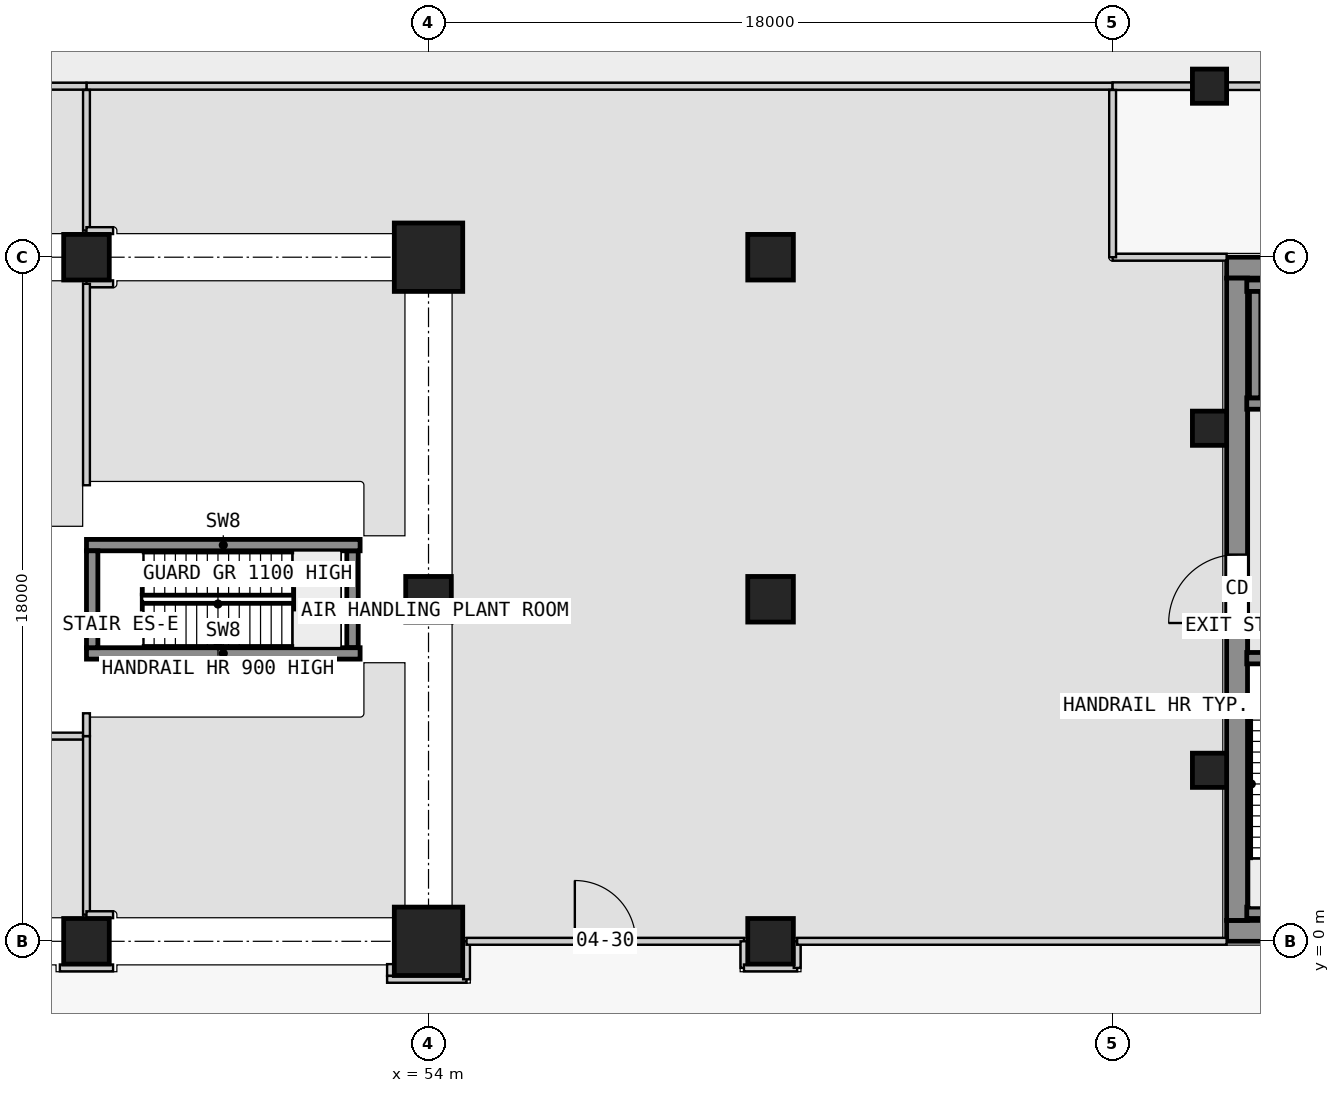
"""IFC4 building model, lengths in metres.
Left out: names, types, materials, properties, quantities, classifications, styles, units other than length and angle.
Written with IfcOpenShell. Run it as: python <this file> out.ifc"""

import sys

from ifc_helpers import new_model, si_unit, direction, frame, frame_2d, origin, origin_2d, place, context, subcontext, project, spatial, rectangle, extrude, element, fill, save


model = new_model("IFC4")
c1 = context("Model", 3, precision=1e-05, world=origin(), true_north=direction((0.0, 1.0)))
c2 = subcontext(c1, "Body", "Model", "MODEL_VIEW")
j1 = project(units=[si_unit("LENGTHUNIT", "METRE"), si_unit("PLANEANGLEUNIT", "RADIAN")], contexts=[c1])
p1 = place(None, origin())
s1 = spatial("IfcSite", under=j1, at=p1, CompositionType="ELEMENT")
p2 = place(p1, origin())
s2 = spatial("IfcBuilding", under=s1, at=p2, CompositionType="ELEMENT")
p3 = place(p2, frame((0.0, 0.0, 21.8)))
s3 = spatial("IfcBuildingStorey", under=s2, at=p3, CompositionType="ELEMENT", Elevation=21.8)
for number, where, z_axis, x_axis in (
    (1, (45.0, 0.0, 0.0), (0.0, 0.0, 1.0), (1.0, 0.0, 0.0)),
    (2, (45.0, 18.0, 0.0), (0.0, 0.0, 1.0), (1.0, 0.0, 0.0)),
):
    element("IfcColumn", number, at=place(p3, frame(where, z_axis=z_axis, x_axis=x_axis)), inside=s3, PredefinedType="COLUMN", context=c2, shape_type="SweptSolid", body=[
        extrude(rectangle(XDim=1.2, YDim=1.2, at=origin_2d()), origin(), (0.0, 0.0, 1.0), 5.0),
    ])
p4 = place(p3, frame((54.0, 0.0, 0.0), z_axis=(0.0, 0.0, 1.0), x_axis=(1.0, 0.0, 0.0)))
e3 = element("IfcColumn", 3, at=p4, inside=s3, PredefinedType="COLUMN", context=c2, shape_type="SweptSolid", body=[
    extrude(rectangle(XDim=1.8, YDim=1.8, at=origin_2d()), origin(), (0.0, 0.0, 1.0), 5.0),
])
p5 = place(p3, frame((54.0, 9.0, 0.0), z_axis=(0.0, 0.0, 1.0), x_axis=(1.0, 0.0, 0.0)))
e4 = element("IfcColumn", 4, at=p5, inside=s3, PredefinedType="COLUMN", context=c2, shape_type="SweptSolid", body=[
    extrude(rectangle(XDim=1.2, YDim=1.2, at=origin_2d()), origin(), (0.0, 0.0, 1.0), 5.0),
])
p6 = place(p3, frame((54.0, 18.0, 0.0), z_axis=(0.0, 0.0, 1.0), x_axis=(1.0, 0.0, 0.0)))
e5 = element("IfcColumn", 5, at=p6, inside=s3, PredefinedType="COLUMN", context=c2, shape_type="SweptSolid", body=[
    extrude(rectangle(XDim=1.8, YDim=1.8, at=origin_2d()), origin(), (0.0, 0.0, 1.0), 5.0),
])
for number, where, z_axis, x_axis in (
    (6, (63.0, 0.0, 0.0), (0.0, 0.0, 1.0), (1.0, 0.0, 0.0)),
    (7, (63.0, 9.0, 0.0), (0.0, 0.0, 1.0), (1.0, 0.0, 0.0)),
    (8, (63.0, 18.0, 0.0), (0.0, 0.0, 1.0), (1.0, 0.0, 0.0)),
):
    element("IfcColumn", number, at=place(p3, frame(where, z_axis=z_axis, x_axis=x_axis)), inside=s3, PredefinedType="COLUMN", context=c2, shape_type="SweptSolid", body=[
        extrude(rectangle(XDim=1.2, YDim=1.2, at=origin_2d()), origin(), (0.0, 0.0, 1.0), 5.0),
    ])
for number, where, z_axis, x_axis in (
    (9, (74.55, 22.5, 0.0), (0.0, 0.0, 1.0), (1.0, 0.0, 0.0)),
    (10, (74.55, 13.5, 0.0), (0.0, 0.0, 1.0), (1.0, 0.0, 0.0)),
    (11, (74.55, 4.5, 0.0), (0.0, 0.0, 1.0), (1.0, 0.0, 0.0)),
):
    element("IfcColumn", number, at=place(p3, frame(where, z_axis=z_axis, x_axis=x_axis)), inside=s3, PredefinedType="COLUMN", context=c2, shape_type="SweptSolid", body=[
        extrude(rectangle(XDim=0.9, YDim=0.9, at=origin_2d()), origin(), (0.0, 0.0, 1.0), 5.0),
    ])
for number, where, z_axis, x_axis in (
    (12, (75.0, 0.275, 0.0), (0.0, 0.0, 1.0), (1.0, 0.0, 0.0)),
    (13, (75.0, 17.725, 0.0), (0.0, 0.0, 1.0), (1.0, 0.0, 0.0)),
):
    element("IfcWall", number, at=place(p3, frame(where, z_axis=z_axis, x_axis=x_axis)), inside=s3, PredefinedType="SHEAR", context=c2, shape_type="SweptSolid", body=[
        extrude(rectangle(XDim=14.5, YDim=0.55, at=frame_2d((7.25, 0.0))), origin(), (0.0, 0.0, 1.0), 4.5),
    ])
p7 = place(p3, frame((75.275, 0.55, 0.0), z_axis=(0.0, 0.0, 1.0), x_axis=(0.0, 1.0, 0.0)))
e14 = element("IfcWall", 14, at=p7, inside=s3, PredefinedType="SHEAR", context=c2, shape_type="SweptSolid", body=[
    extrude(rectangle(XDim=16.9, YDim=0.55, at=frame_2d((8.45, 0.0))), origin(), (0.0, 0.0, 1.0), 4.5),
])
p8 = place(p7, frame((7.825, 0.0, 0.0)))
e15 = element("IfcOpeningElement", 15, at=p8, cuts=e14, PredefinedType="OPENING", context=c2, shape_type="SweptSolid", body=[
    extrude(rectangle(XDim=1.8, YDim=2.1, at=frame_2d((0.9, 1.05))), frame((0.0, 0.285, 0.0), z_axis=(0.0, -1.0, 0.0), x_axis=(1.0, 0.0, 0.0)), (0.0, 0.0, 1.0), 0.57),
])
p9 = place(p3, frame((75.53, 0.75, 0.0), z_axis=(0.0, 0.0, 1.0), x_axis=(1.0, 0.0, 0.0)))
e16 = element("IfcWall", 16, at=p9, inside=s3, PredefinedType="SHEAR", context=c2, shape_type="SweptSolid", body=[
    extrude(rectangle(XDim=5.77, YDim=0.3, at=frame_2d((2.885, 0.0))), origin(), (0.0, 0.0, 1.0), 4.5),
])
p10 = place(p3, frame((75.53, 7.45, 0.0), z_axis=(0.0, 0.0, 1.0), x_axis=(1.0, 0.0, 0.0)))
e17 = element("IfcWall", 17, at=p10, inside=s3, PredefinedType="SHEAR", context=c2, shape_type="SweptSolid", body=[
    extrude(rectangle(XDim=5.77, YDim=0.3, at=frame_2d((2.885, 0.0))), origin(), (0.0, 0.0, 1.0), 4.5),
])
p11 = place(p10, frame((0.75, 0.0, 0.0)))
e18 = element("IfcOpeningElement", 18, at=p11, cuts=e17, PredefinedType="OPENING", context=c2, shape_type="SweptSolid", body=[
    extrude(rectangle(XDim=1.1, YDim=2.1, at=frame_2d((0.55, 1.05))), frame((0.0, 0.16, 0.0), z_axis=(0.0, -1.0, 0.0), x_axis=(1.0, 0.0, 0.0)), (0.0, 0.0, 1.0), 0.32),
])
p12 = place(p10, frame((3.55, 0.0, 0.0)))
e19 = element("IfcOpeningElement", 19, at=p12, cuts=e17, PredefinedType="OPENING", context=c2, shape_type="SweptSolid", body=[
    extrude(rectangle(XDim=1.1, YDim=2.1, at=frame_2d((0.55, 1.05))), frame((0.0, 0.16, 0.0), z_axis=(0.0, -1.0, 0.0), x_axis=(1.0, 0.0, 0.0)), (0.0, 0.0, 1.0), 0.32),
])
p13 = place(p3, frame((75.53, 17.25, 0.0), z_axis=(0.0, 0.0, 1.0), x_axis=(1.0, 0.0, 0.0)))
e20 = element("IfcWall", 20, at=p13, inside=s3, PredefinedType="SHEAR", context=c2, shape_type="SweptSolid", body=[
    extrude(rectangle(XDim=9.97, YDim=0.3, at=frame_2d((4.985, 0.0))), origin(), (0.0, 0.0, 1.0), 4.5),
])
p14 = place(p3, frame((75.53, 14.15, 0.0), z_axis=(0.0, 0.0, 1.0), x_axis=(1.0, 0.0, 0.0)))
e21 = element("IfcWall", 21, at=p14, inside=s3, PredefinedType="SHEAR", context=c2, shape_type="SweptSolid", body=[
    extrude(rectangle(XDim=9.97, YDim=0.3, at=frame_2d((4.985, 0.0))), origin(), (0.0, 0.0, 1.0), 4.5),
])
p15 = place(p14, frame((0.85, 0.0, 0.0)))
e22 = element("IfcOpeningElement", 22, at=p15, cuts=e21, PredefinedType="OPENING", context=c2, shape_type="SweptSolid", body=[
    extrude(rectangle(XDim=1.1, YDim=2.1, at=frame_2d((0.55, 1.05))), frame((0.0, 0.16, 0.0), z_axis=(0.0, -1.0, 0.0), x_axis=(1.0, 0.0, 0.0)), (0.0, 0.0, 1.0), 0.32),
])
p16 = place(p14, frame((3.35, 0.0, 0.0)))
e23 = element("IfcOpeningElement", 23, at=p16, cuts=e21, PredefinedType="OPENING", context=c2, shape_type="SweptSolid", body=[
    extrude(rectangle(XDim=1.1, YDim=2.1, at=frame_2d((0.55, 1.05))), frame((0.0, 0.16, 0.0), z_axis=(0.0, -1.0, 0.0), x_axis=(1.0, 0.0, 0.0)), (0.0, 0.0, 1.0), 0.32),
])
p17 = place(p14, frame((5.75, 0.0, 0.0)))
e24 = element("IfcOpeningElement", 24, at=p17, cuts=e21, PredefinedType="OPENING", context=c2, shape_type="SweptSolid", body=[
    extrude(rectangle(XDim=1.1, YDim=2.1, at=frame_2d((0.55, 1.05))), frame((0.0, 0.16, 0.0), z_axis=(0.0, -1.0, 0.0), x_axis=(1.0, 0.0, 0.0)), (0.0, 0.0, 1.0), 0.32),
])
p18 = place(p14, frame((8.05, 0.0, 0.0)))
e25 = element("IfcOpeningElement", 25, at=p18, cuts=e21, PredefinedType="OPENING", context=c2, shape_type="SweptSolid", body=[
    extrude(rectangle(XDim=1.1, YDim=2.1, at=frame_2d((0.55, 1.05))), frame((0.0, 0.16, 0.0), z_axis=(0.0, -1.0, 0.0), x_axis=(1.0, 0.0, 0.0)), (0.0, 0.0, 1.0), 0.32),
])
p19 = place(p3, frame((75.75, 14.3, 0.0), z_axis=(0.0, 0.0, 1.0), x_axis=(0.0, 1.0, 0.0)))
e26 = element("IfcWall", 26, at=p19, inside=s3, PredefinedType="SHEAR", context=c2, shape_type="SweptSolid", body=[
    extrude(rectangle(XDim=2.8, YDim=0.3, at=frame_2d((1.4, 0.0))), origin(), (0.0, 0.0, 1.0), 4.5),
])
for number, where, z_axis, x_axis in (
    (27, (45.15, 7.725, 0.0), (0.0, 0.0, 1.0), (0.0, 1.0, 0.0)),
    (28, (52.0, 7.725, 0.0), (0.0, 0.0, 1.0), (0.0, 1.0, 0.0)),
):
    element("IfcWall", number, at=place(p3, frame(where, z_axis=z_axis, x_axis=x_axis)), inside=s3, PredefinedType="SHEAR", context=c2, shape_type="SweptSolid", body=[
        extrude(rectangle(XDim=2.55, YDim=0.3, at=frame_2d((1.275, 0.0))), origin(), (0.0, 0.0, 1.0), 5.0),
    ])
for number, where, z_axis, x_axis in (
    (29, (45.0, 7.575, 0.0), (0.0, 0.0, 1.0), (1.0, 0.0, 0.0)),
    (30, (45.0, 10.425, 0.0), (0.0, 0.0, 1.0), (1.0, 0.0, 0.0)),
):
    element("IfcWall", number, at=place(p3, frame(where, z_axis=z_axis, x_axis=x_axis)), inside=s3, PredefinedType="SHEAR", context=c2, shape_type="SweptSolid", body=[
        extrude(rectangle(XDim=7.2, YDim=0.3, at=frame_2d((3.6, 0.0))), origin(), (0.0, 0.0, 1.0), 5.0),
    ])
p20 = place(p3, frame((53.0, -0.6, 0.0), z_axis=(0.0, 0.0, 1.0), x_axis=(0.0, -1.0, 0.0)))
e31 = element("IfcWall", 31, at=p20, inside=s3, PredefinedType="PARTITIONING", context=c2, shape_type="SweptSolid", body=[
    extrude(rectangle(XDim=0.31, YDim=0.18, at=frame_2d((0.155, 0.0))), origin(), (0.0, 0.0, 1.0), 4.5),
])
p21 = place(p3, frame((52.91, -1.0, 0.0), z_axis=(0.0, 0.0, 1.0), x_axis=(1.0, 0.0, 0.0)))
e32 = element("IfcWall", 32, at=p21, inside=s3, PredefinedType="PARTITIONING", context=c2, shape_type="SweptSolid", body=[
    extrude(rectangle(XDim=2.09, YDim=0.18, at=frame_2d((1.045, 0.0))), origin(), (0.0, 0.0, 1.0), 4.5),
])
p22 = place(p3, frame((55.0, -1.0, 0.0), z_axis=(0.0, 0.0, 1.0), x_axis=(0.0, 1.0, 0.0)))
e33 = element("IfcWall", 33, at=p22, inside=s3, PredefinedType="PARTITIONING", context=c2, shape_type="SweptSolid", body=[
    extrude(rectangle(XDim=1.0, YDim=0.18, at=frame_2d((0.5, 0.0))), origin(), (0.0, 0.0, 1.0), 4.5),
])
p23 = place(p3, frame((55.0, 0.0, 0.0), z_axis=(0.0, 0.0, 1.0), x_axis=(1.0, 0.0, 0.0)))
e34 = element("IfcWall", 34, at=p23, inside=s3, PredefinedType="PARTITIONING", context=c2, shape_type="SweptSolid", body=[
    extrude(rectangle(XDim=7.3, YDim=0.18, at=frame_2d((3.65, 0.0))), origin(), (0.0, 0.0, 1.0), 4.5),
])
p24 = place(p23, frame((2.85, 0.0, 0.0)))
e35 = element("IfcOpeningElement", 35, at=p24, cuts=e34, PredefinedType="OPENING", context=c2, shape_type="SweptSolid", body=[
    extrude(rectangle(XDim=1.6, YDim=2.4, at=frame_2d((0.8, 1.2))), frame((0.0, 0.1, 0.0), z_axis=(0.0, -1.0, 0.0), x_axis=(1.0, 0.0, 0.0)), (0.0, 0.0, 1.0), 0.2),
])
p25 = place(p3, frame((62.3, 0.0, 0.0), z_axis=(0.0, 0.0, 1.0), x_axis=(0.0, -1.0, 0.0)))
e36 = element("IfcWall", 36, at=p25, inside=s3, PredefinedType="PARTITIONING", context=c2, shape_type="SweptSolid", body=[
    extrude(rectangle(XDim=0.7, YDim=0.18, at=frame_2d((0.35, 0.0))), origin(), (0.0, 0.0, 1.0), 4.5),
])
p26 = place(p3, frame((62.3, -0.7, 0.0), z_axis=(0.0, 0.0, 1.0), x_axis=(1.0, 0.0, 0.0)))
e37 = element("IfcWall", 37, at=p26, inside=s3, PredefinedType="PARTITIONING", context=c2, shape_type="SweptSolid", body=[
    extrude(rectangle(XDim=1.4, YDim=0.18, at=frame_2d((0.7, 0.0))), origin(), (0.0, 0.0, 1.0), 4.5),
])
p27 = place(p3, frame((63.7, -0.7, 0.0), z_axis=(0.0, 0.0, 1.0), x_axis=(0.0, 1.0, 0.0)))
e38 = element("IfcWall", 38, at=p27, inside=s3, PredefinedType="PARTITIONING", context=c2, shape_type="SweptSolid", body=[
    extrude(rectangle(XDim=0.7, YDim=0.18, at=frame_2d((0.35, 0.0))), origin(), (0.0, 0.0, 1.0), 4.5),
])
p28 = place(p3, frame((63.7, 0.0, 0.0), z_axis=(0.0, 0.0, 1.0), x_axis=(1.0, 0.0, 0.0)))
e39 = element("IfcWall", 39, at=p28, inside=s3, PredefinedType="PARTITIONING", context=c2, shape_type="SweptSolid", body=[
    extrude(rectangle(XDim=11.3, YDim=0.18, at=frame_2d((5.65, 0.0))), origin(), (0.0, 0.0, 1.0), 3.7),
])
p29 = place(p3, frame((72.0, 22.5, 0.0), z_axis=(0.0, 0.0, 1.0), x_axis=(-1.0, 0.0, 0.0)))
e40 = element("IfcWall", 40, at=p29, inside=s3, PredefinedType="PARTITIONING", context=c2, shape_type="SweptSolid", body=[
    extrude(rectangle(XDim=27.0, YDim=0.18, at=frame_2d((13.5, 0.0))), origin(), (0.0, 0.0, 1.0), 4.5),
])
p30 = place(p3, frame((44.3, -0.7, 0.0), z_axis=(0.0, 0.0, 1.0), x_axis=(1.0, 0.0, 0.0)))
e41 = element("IfcWall", 41, at=p30, inside=s3, PredefinedType="PARTITIONING", context=c2, shape_type="SweptSolid", body=[
    extrude(rectangle(XDim=1.4, YDim=0.18, at=frame_2d((0.7, 0.0))), origin(), (0.0, 0.0, 1.0), 4.5),
])
p31 = place(p3, frame((82.05, 22.5, 0.0), z_axis=(0.0, 0.0, 1.0), x_axis=(-1.0, 0.0, 0.0)))
e42 = element("IfcWall", 42, at=p31, inside=s3, PredefinedType="PARTITIONING", context=c2, shape_type="SweptSolid", body=[
    extrude(rectangle(XDim=7.05, YDim=0.2, at=frame_2d((3.525, 0.0))), origin(), (0.0, 0.0, 1.0), 4.5),
])
p32 = place(p3, frame((74.1, 22.5, 0.0), z_axis=(0.0, 0.0, 1.0), x_axis=(-1.0, 0.0, 0.0)))
e43 = element("IfcWall", 43, at=p32, inside=s3, PredefinedType="PARTITIONING", context=c2, shape_type="SweptSolid", body=[
    extrude(rectangle(XDim=2.1, YDim=0.2, at=frame_2d((1.05, 0.0))), origin(), (0.0, 0.0, 1.0), 4.5),
])
p33 = place(p3, frame((45.0, 22.5, 0.0), z_axis=(0.0, 0.0, 1.0), x_axis=(-1.0, 0.0, 0.0)))
e44 = element("IfcWall", 44, at=p33, inside=s3, PredefinedType="PARTITIONING", context=c2, shape_type="SweptSolid", body=[
    extrude(rectangle(XDim=18.0, YDim=0.18, at=frame_2d((9.0, 0.0))), origin(), (0.0, 0.0, 1.0), 4.5),
])
p34 = place(p33, frame((8.1, 0.0, 0.0)))
e45 = element("IfcOpeningElement", 45, at=p34, cuts=e44, PredefinedType="OPENING", context=c2, shape_type="SweptSolid", body=[
    extrude(rectangle(XDim=1.6, YDim=2.4, at=frame_2d((0.8, 1.2))), frame((0.0, 0.1, 0.0), z_axis=(0.0, -1.0, 0.0), x_axis=(1.0, 0.0, 0.0)), (0.0, 0.0, 1.0), 0.2),
])
p35 = place(p3, frame((45.0, 5.4, 0.0), z_axis=(0.0, 0.0, 1.0), x_axis=(-1.0, 0.0, 0.0)))
e46 = element("IfcWall", 46, at=p35, inside=s3, PredefinedType="PARTITIONING", context=c2, shape_type="SweptSolid", body=[
    extrude(rectangle(XDim=8.4, YDim=0.18, at=frame_2d((4.2, 0.0))), origin(), (0.0, 0.0, 1.0), 4.5),
])
p36 = place(p3, frame((45.0, 22.4, 0.0), z_axis=(0.0, 0.0, 1.0), x_axis=(0.0, -1.0, 0.0)))
e47 = element("IfcWall", 47, at=p36, inside=s3, PredefinedType="PARTITIONING", context=c2, shape_type="SweptSolid", body=[
    extrude(rectangle(XDim=3.7, YDim=0.18, at=frame_2d((1.85, 0.0))), origin(), (0.0, 0.0, 1.0), 4.5),
])
for number, where, z_axis, x_axis in (
    (48, (45.0, 18.7, 0.0), (0.0, 0.0, 1.0), (1.0, 0.0, 0.0)),
    (49, (45.7, 17.3, 0.0), (0.0, 0.0, 1.0), (-1.0, 0.0, 0.0)),
):
    element("IfcWall", number, at=place(p3, frame(where, z_axis=z_axis, x_axis=x_axis)), inside=s3, PredefinedType="PARTITIONING", context=c2, shape_type="SweptSolid", body=[
        extrude(rectangle(XDim=0.7, YDim=0.18, at=frame_2d((0.35, 0.0))), origin(), (0.0, 0.0, 1.0), 4.5),
    ])
p37 = place(p3, frame((45.0, 17.3, 0.0), z_axis=(0.0, 0.0, 1.0), x_axis=(0.0, -1.0, 0.0)))
e50 = element("IfcWall", 50, at=p37, inside=s3, PredefinedType="PARTITIONING", context=c2, shape_type="SweptSolid", body=[
    extrude(rectangle(XDim=5.3, YDim=0.18, at=frame_2d((2.65, 0.0))), origin(), (0.0, 0.0, 1.0), 4.5),
])
p38 = place(p3, frame((75.0, 18.0, 0.0), z_axis=(0.0, 0.0, 1.0), x_axis=(-1.0, 0.0, 0.0)))
e51 = element("IfcWall", 51, at=p38, inside=s3, PredefinedType="PARTITIONING", context=c2, shape_type="SweptSolid", body=[
    extrude(rectangle(XDim=3.0, YDim=0.18, at=frame_2d((1.5, 0.0))), origin(), (0.0, 0.0, 1.0), 3.7),
])
p39 = place(p3, frame((72.0, 18.0, 0.0), z_axis=(0.0, 0.0, 1.0), x_axis=(0.0, 1.0, 0.0)))
e52 = element("IfcWall", 52, at=p39, inside=s3, PredefinedType="PARTITIONING", context=c2, shape_type="SweptSolid", body=[
    extrude(rectangle(XDim=4.4, YDim=0.18, at=frame_2d((2.2, 0.0))), origin(), (0.0, 0.0, 1.0), 4.5),
])
p40 = place(p3, frame((45.0, 5.4, 0.0), z_axis=(0.0, 0.0, 1.0), x_axis=(0.0, -1.0, 0.0)))
e53 = element("IfcWall", 53, at=p40, inside=s3, PredefinedType="PARTITIONING", context=c2, shape_type="SweptSolid", body=[
    extrude(rectangle(XDim=4.7, YDim=0.18, at=frame_2d((2.35, 0.0))), origin(), (0.0, 0.0, 1.0), 4.5),
])
p41 = place(p3, frame((45.0, 0.7, 0.0), z_axis=(0.0, 0.0, 1.0), x_axis=(1.0, 0.0, 0.0)))
e54 = element("IfcWall", 54, at=p41, inside=s3, PredefinedType="PARTITIONING", context=c2, shape_type="SweptSolid", body=[
    extrude(rectangle(XDim=0.7, YDim=0.18, at=frame_2d((0.35, 0.0))), origin(), (0.0, 0.0, 1.0), 4.5),
])
p42 = place(p3, frame((45.0, 6.0, 0.0), z_axis=(0.0, 0.0, 1.0), x_axis=(0.0, -1.0, 0.0)))
e55 = element("IfcWall", 55, at=p42, inside=s3, PredefinedType="PARTITIONING", context=c2, shape_type="SweptSolid", body=[
    extrude(rectangle(XDim=0.6, YDim=0.18, at=frame_2d((0.3, 0.0))), origin(), (0.0, 0.0, 1.0), 4.5),
])
p43 = place(p8, origin())
e56 = element("IfcDoor", 56, at=p43, inside=s3, OperationType="DOUBLE_DOOR_SINGLE_SWING", PredefinedType="DOOR", context=c2, shape_type="SweptSolid", body=[
    extrude(rectangle(XDim=1.8, YDim=2.1, at=frame_2d((0.9, 1.05))), frame((0.0, 0.025, 0.0), z_axis=(0.0, -1.0, 0.0), x_axis=(1.0, 0.0, 0.0)), (0.0, 0.0, 1.0), 0.05),
])
fill(e15, e56)
p44 = place(p24, origin())
e57 = element("IfcDoor", 57, at=p44, inside=s3, OperationType="SINGLE_SWING_LEFT", PredefinedType="DOOR", context=c2, shape_type="SweptSolid", body=[
    extrude(rectangle(XDim=1.6, YDim=2.4, at=frame_2d((0.8, 1.2))), frame((0.0, 0.025, 0.0), z_axis=(0.0, -1.0, 0.0), x_axis=(1.0, 0.0, 0.0)), (0.0, 0.0, 1.0), 0.05),
])
fill(e35, e57)
save(model, sys.argv[1])
